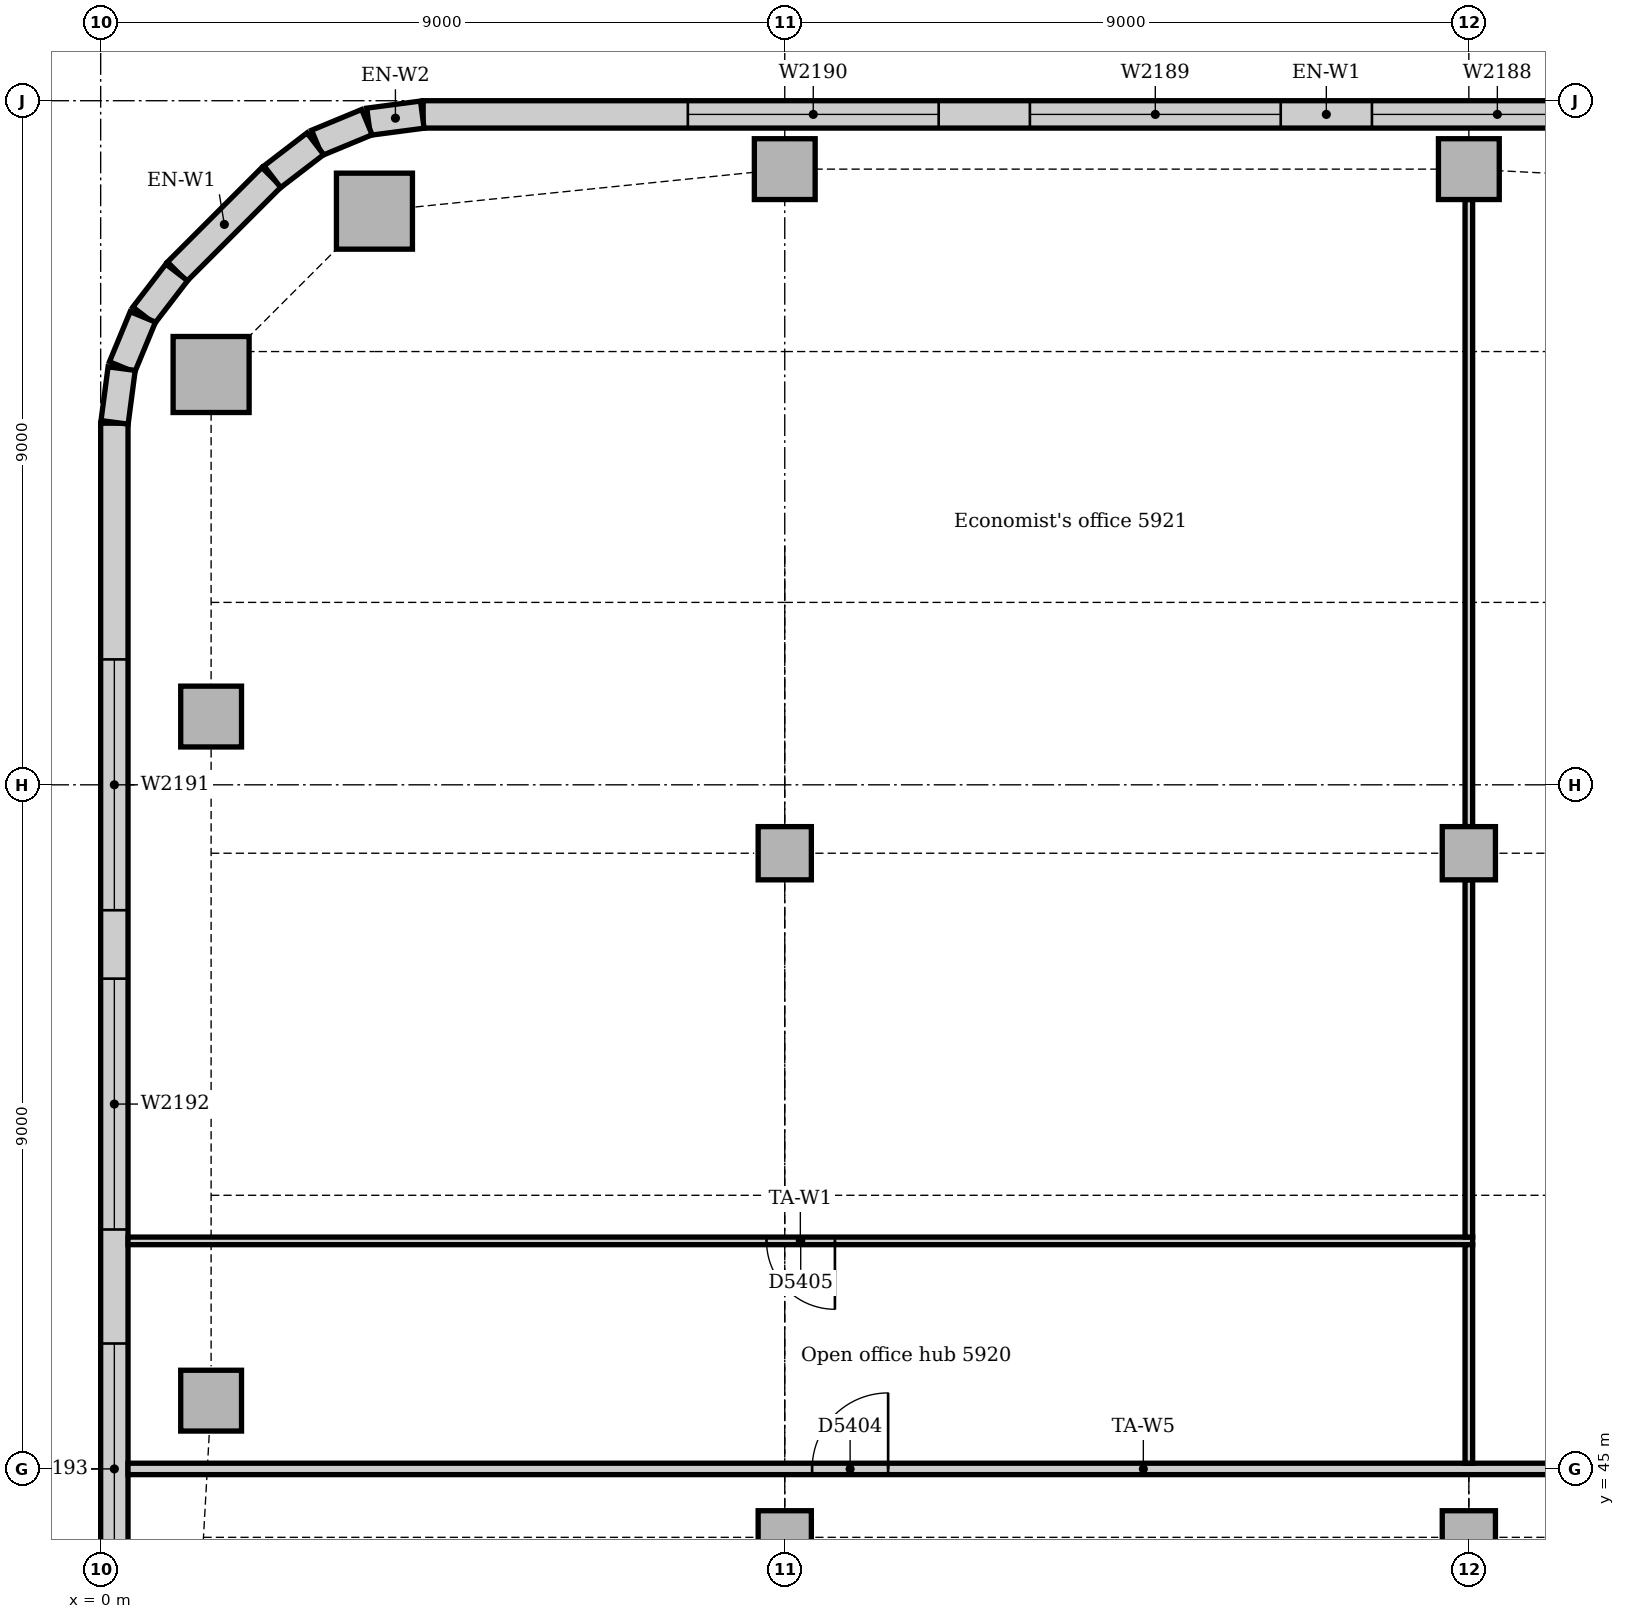
"""IFC4 building model, lengths in metres.
Left out: names, types, materials, properties, quantities, classifications, styles, units other than length and angle.
Written with IfcOpenShell. Run it as: python <this file> out.ifc"""

import sys

from ifc_helpers import new_model, si_unit, direction, frame, frame_2d, origin, origin_2d, place, context, subcontext, project, spatial, rectangle, extrude, element, fill, save


model = new_model("IFC4")
c1 = context("Model", 3, precision=1e-05, world=origin(), true_north=direction((0.0, 1.0)))
c2 = subcontext(c1, "Body", "Model", "MODEL_VIEW")
j1 = project(units=[si_unit("LENGTHUNIT", "METRE"), si_unit("PLANEANGLEUNIT", "RADIAN")], contexts=[c1])
p1 = place(None, origin())
s1 = spatial("IfcSite", under=j1, at=p1, CompositionType="ELEMENT")
p2 = place(p1, origin())
s2 = spatial("IfcBuilding", under=s1, at=p2, CompositionType="ELEMENT")
p3 = place(p2, frame((0.0, 0.0, 247.0)))
s3 = spatial("IfcBuildingStorey", under=s2, at=p3, CompositionType="ELEMENT", Elevation=247.0)
for number, where, z_axis, x_axis in (
    (1, (3.602, 61.547, -0.15), (0.0, 0.0, 1.0), (1.0, 0.0, 0.0)),
    (2, (1.453, 59.398, -0.15), (0.0, 0.0, 1.0), (1.0, 0.0, 0.0)),
):
    element("IfcColumn", number, at=place(p3, frame(where, z_axis=z_axis, x_axis=x_axis)), inside=s3, PredefinedType="COLUMN", context=c2, shape_type="SweptSolid", body=[
        extrude(rectangle(XDim=1.0, YDim=1.0, at=origin_2d()), origin(), (0.0, 0.0, 1.0), 4.0),
    ])
for number, where, z_axis, x_axis in (
    (3, (9.0, 62.1, -0.15), (0.0, 0.0, 1.0), (1.0, 0.0, 0.0)),
    (4, (18.0, 62.1, -0.15), (0.0, 0.0, 1.0), (1.0, 0.0, 0.0)),
):
    element("IfcColumn", number, at=place(p3, frame(where, z_axis=z_axis, x_axis=x_axis)), inside=s3, PredefinedType="COLUMN", context=c2, shape_type="SweptSolid", body=[
        extrude(rectangle(XDim=0.8, YDim=0.8, at=origin_2d()), origin(), (0.0, 0.0, 1.0), 4.0),
    ])
for number, where, z_axis, x_axis in (
    (5, (1.453, 45.898, 0.0), (0.0, 0.0, 1.0), (1.0, 0.0, 0.0)),
    (6, (1.453, 54.898, 0.0), (0.0, 0.0, 1.0), (1.0, 0.0, 0.0)),
):
    element("IfcColumn", number, at=place(p3, frame(where, z_axis=z_axis, x_axis=x_axis)), inside=s3, PredefinedType="COLUMN", context=c2, shape_type="SweptSolid", body=[
        extrude(rectangle(XDim=0.8, YDim=0.8, at=origin_2d()), origin(), (0.0, 0.0, 1.0), 3.85),
    ])
for number, where, z_axis, x_axis in (
    (7, (9.0, 44.1, 0.0), (0.0, 0.0, 1.0), (1.0, 0.0, 0.0)),
    (8, (9.0, 53.1, 0.0), (0.0, 0.0, 1.0), (1.0, 0.0, 0.0)),
    (9, (18.0, 44.1, 0.0), (0.0, 0.0, 1.0), (1.0, 0.0, 0.0)),
    (10, (18.0, 53.1, 0.0), (0.0, 0.0, 1.0), (1.0, 0.0, 0.0)),
):
    element("IfcColumn", number, at=place(p3, frame(where, z_axis=z_axis, x_axis=x_axis)), inside=s3, PredefinedType="COLUMN", context=c2, shape_type="SweptSolid", body=[
        extrude(rectangle(XDim=0.7, YDim=0.7, at=origin_2d()), origin(), (0.0, 0.0, 1.0), 3.85),
    ])
p4 = place(p3, frame((28.007, 62.82, 0.0), z_axis=(0.0, 0.0, 1.0), x_axis=(-1.0, 0.0, 0.0)))
e11 = element("IfcWall", 11, at=p4, inside=s3, PredefinedType="STANDARD", context=c2, shape_type="SweptSolid", body=[
    extrude(rectangle(XDim=23.765, YDim=0.36, at=frame_2d((11.882, 0.0))), origin(), (0.0, 0.0, 1.0), 3.85),
])
p5 = place(p4, frame((3.482, 0.0, 0.9)))
e12 = element("IfcOpeningElement", 12, at=p5, cuts=e11, PredefinedType="OPENING", context=c2, shape_type="SweptSolid", body=[
    extrude(rectangle(XDim=3.3, YDim=1.6, at=frame_2d((1.65, 0.8))), frame((0.0, 0.19, 0.0), z_axis=(0.0, -1.0, 0.0), x_axis=(1.0, 0.0, 0.0)), (0.0, 0.0, 1.0), 0.38),
])
p6 = place(p4, frame((7.982, 0.0, 0.9)))
e13 = element("IfcOpeningElement", 13, at=p6, cuts=e11, PredefinedType="OPENING", context=c2, shape_type="SweptSolid", body=[
    extrude(rectangle(XDim=3.3, YDim=1.6, at=frame_2d((1.65, 0.8))), frame((0.0, 0.19, 0.0), z_axis=(0.0, -1.0, 0.0), x_axis=(1.0, 0.0, 0.0)), (0.0, 0.0, 1.0), 0.38),
])
p7 = place(p4, frame((12.482, 0.0, 0.9)))
e14 = element("IfcOpeningElement", 14, at=p7, cuts=e11, PredefinedType="OPENING", context=c2, shape_type="SweptSolid", body=[
    extrude(rectangle(XDim=3.3, YDim=1.6, at=frame_2d((1.65, 0.8))), frame((0.0, 0.19, 0.0), z_axis=(0.0, -1.0, 0.0), x_axis=(1.0, 0.0, 0.0)), (0.0, 0.0, 1.0), 0.38),
])
p8 = place(p4, frame((16.982, 0.0, 0.9)))
e15 = element("IfcOpeningElement", 15, at=p8, cuts=e11, PredefinedType="OPENING", context=c2, shape_type="SweptSolid", body=[
    extrude(rectangle(XDim=3.3, YDim=1.6, at=frame_2d((1.65, 0.8))), frame((0.0, 0.19, 0.0), z_axis=(0.0, -1.0, 0.0), x_axis=(1.0, 0.0, 0.0)), (0.0, 0.0, 1.0), 0.38),
])
p9 = place(p3, frame((2.249, 61.994, 0.0), z_axis=(0.0, 0.0, 1.0), x_axis=(-0.707106781187, -0.707106781187, 0.0)))
e16 = element("IfcWall", 16, at=p9, inside=s3, PredefinedType="STANDARD", context=c2, shape_type="SweptSolid", body=[
    extrude(rectangle(XDim=1.757, YDim=0.36, at=frame_2d((0.879, 0.0))), origin(), (0.0, 0.0, 1.0), 3.85),
])
p10 = place(p3, frame((0.18, 58.757, 0.0), z_axis=(0.0, 0.0, 1.0), x_axis=(0.0, -1.0, 0.0)))
e17 = element("IfcWall", 17, at=p10, inside=s3, PredefinedType="STANDARD", context=c2, shape_type="SweptSolid", body=[
    extrude(rectangle(XDim=16.757, YDim=0.36, at=frame_2d((8.379, 0.0))), origin(), (0.0, 0.0, 1.0), 3.85),
])
p11 = place(p10, frame((3.107, 0.0, 0.9)))
e18 = element("IfcOpeningElement", 18, at=p11, cuts=e17, PredefinedType="OPENING", context=c2, shape_type="SweptSolid", body=[
    extrude(rectangle(XDim=3.3, YDim=1.6, at=frame_2d((1.65, 0.8))), frame((0.0, 0.19, 0.0), z_axis=(0.0, -1.0, 0.0), x_axis=(1.0, 0.0, 0.0)), (0.0, 0.0, 1.0), 0.38),
])
p12 = place(p10, frame((7.307, 0.0, 0.9)))
e19 = element("IfcOpeningElement", 19, at=p12, cuts=e17, PredefinedType="OPENING", context=c2, shape_type="SweptSolid", body=[
    extrude(rectangle(XDim=3.3, YDim=1.6, at=frame_2d((1.65, 0.8))), frame((0.0, 0.19, 0.0), z_axis=(0.0, -1.0, 0.0), x_axis=(1.0, 0.0, 0.0)), (0.0, 0.0, 1.0), 0.38),
])
p13 = place(p10, frame((12.107, 0.0, 0.9)))
e20 = element("IfcOpeningElement", 20, at=p13, cuts=e17, PredefinedType="OPENING", context=c2, shape_type="SweptSolid", body=[
    extrude(rectangle(XDim=3.3, YDim=1.6, at=frame_2d((1.65, 0.8))), frame((0.0, 0.19, 0.0), z_axis=(0.0, -1.0, 0.0), x_axis=(1.0, 0.0, 0.0)), (0.0, 0.0, 1.0), 0.38),
])
for number, where, z_axis, x_axis in (
    (21, (4.231, 62.817, 0.0), (0.0, 0.0, 1.0), (-0.991, -0.131, 0.0)),
    (22, (3.503, 62.718, 0.0), (0.0, 0.0, 1.0), (-0.924, -0.383, 0.0)),
):
    element("IfcWall", number, at=place(p3, frame(where, z_axis=z_axis, x_axis=x_axis)), inside=s3, PredefinedType="STANDARD", context=c2, shape_type="SweptSolid", body=[
        extrude(rectangle(XDim=0.713, YDim=0.36, at=frame_2d((0.356, 0.0))), origin(), (0.0, 0.0, 1.0), 3.85),
    ])
for number, where, z_axis, x_axis in (
    (23, (2.825, 62.434, 0.0), (0.0, 0.0, 1.0), (-0.793, -0.609, 0.0)),
    (24, (1.0, 60.741, 0.0), (0.0, 0.0, 1.0), (-0.609, -0.793, 0.0)),
):
    element("IfcWall", number, at=place(p3, frame(where, z_axis=z_axis, x_axis=x_axis)), inside=s3, PredefinedType="STANDARD", context=c2, shape_type="SweptSolid", body=[
        extrude(rectangle(XDim=0.713, YDim=0.36, at=frame_2d((0.357, 0.0))), origin(), (0.0, 0.0, 1.0), 3.85),
    ])
for number, where, z_axis, x_axis in (
    (25, (0.555, 60.156, 0.0), (0.0, 0.0, 1.0), (-0.383, -0.924, 0.0)),
    (26, (0.276, 59.476, 0.0), (0.0, 0.0, 1.0), (-0.131, -0.991, 0.0)),
):
    element("IfcWall", number, at=place(p3, frame(where, z_axis=z_axis, x_axis=x_axis)), inside=s3, PredefinedType="STANDARD", context=c2, shape_type="SweptSolid", body=[
        extrude(rectangle(XDim=0.713, YDim=0.36, at=frame_2d((0.356, 0.0))), origin(), (0.0, 0.0, 1.0), 3.85),
    ])
p14 = place(p3, frame((0.36, 45.0, 0.0), z_axis=(0.0, 0.0, 1.0), x_axis=(1.0, 0.0, 0.0)))
e27 = element("IfcWall", 27, at=p14, inside=s3, PredefinedType="PARTITIONING", context=c2, shape_type="SweptSolid", body=[
    extrude(rectangle(XDim=26.715, YDim=0.15, at=frame_2d((13.357, 0.0))), origin(), (0.0, 0.0, 1.0), 3.85),
])
p15 = place(p14, frame((9.0, 0.0, 0.0)))
e28 = element("IfcOpeningElement", 28, at=p15, cuts=e27, PredefinedType="OPENING", context=c2, shape_type="SweptSolid", body=[
    extrude(rectangle(XDim=1.0, YDim=2.1, at=frame_2d((0.5, 1.05))), frame((0.0, 0.085, 0.0), z_axis=(0.0, -1.0, 0.0), x_axis=(1.0, 0.0, 0.0)), (0.0, 0.0, 1.0), 0.17),
])
p16 = place(p14, frame((21.64, 0.0, 0.0)))
e29 = element("IfcOpeningElement", 29, at=p16, cuts=e27, PredefinedType="OPENING", context=c2, shape_type="SweptSolid", body=[
    extrude(rectangle(XDim=0.9, YDim=2.1, at=frame_2d((0.45, 1.05))), frame((0.0, 0.085, 0.0), z_axis=(0.0, -1.0, 0.0), x_axis=(1.0, 0.0, 0.0)), (0.0, 0.0, 1.0), 0.17),
])
p17 = place(p3, frame((0.36, 48.0, 0.0), z_axis=(0.0, 0.0, 1.0), x_axis=(1.0, 0.0, 0.0)))
e30 = element("IfcWall", 30, at=p17, inside=s3, PredefinedType="PARTITIONING", context=c2, shape_type="SweptSolid", body=[
    extrude(rectangle(XDim=17.69, YDim=0.1, at=frame_2d((8.845, 0.0))), origin(), (0.0, 0.0, 1.0), 3.85),
])
p18 = place(p17, frame((8.4, 0.0, 0.0)))
e31 = element("IfcOpeningElement", 31, at=p18, cuts=e30, PredefinedType="OPENING", context=c2, shape_type="SweptSolid", body=[
    extrude(rectangle(XDim=0.9, YDim=2.1, at=frame_2d((0.45, 1.05))), frame((0.0, 0.06, 0.0), z_axis=(0.0, -1.0, 0.0), x_axis=(1.0, 0.0, 0.0)), (0.0, 0.0, 1.0), 0.12),
])
p19 = place(p3, frame((18.0, 45.075, 0.0), z_axis=(0.0, 0.0, 1.0), x_axis=(0.0, 1.0, 0.0)))
e32 = element("IfcWall", 32, at=p19, inside=s3, PredefinedType="PARTITIONING", context=c2, shape_type="SweptSolid", body=[
    extrude(rectangle(XDim=2.875, YDim=0.1, at=frame_2d((1.438, 0.0))), origin(), (0.0, 0.0, 1.0), 3.4),
])
p20 = place(p3, frame((18.0, 48.05, 0.0), z_axis=(0.0, 0.0, 1.0), x_axis=(0.0, 1.0, 0.0)))
e33 = element("IfcWall", 33, at=p20, inside=s3, PredefinedType="PARTITIONING", context=c2, shape_type="SweptSolid", body=[
    extrude(rectangle(XDim=4.7, YDim=0.1, at=frame_2d((2.35, 0.0))), origin(), (0.0, 0.0, 1.0), 3.4),
])
p21 = place(p3, frame((18.0, 53.45, 0.0), z_axis=(0.0, 0.0, 1.0), x_axis=(0.0, 1.0, 0.0)))
e34 = element("IfcWall", 34, at=p21, inside=s3, PredefinedType="PARTITIONING", context=c2, shape_type="SweptSolid", body=[
    extrude(rectangle(XDim=8.25, YDim=0.1, at=frame_2d((4.125, 0.0))), origin(), (0.0, 0.0, 1.0), 3.4),
])
p22 = place(p6, origin())
e35 = element("IfcWindow", 35, at=p22, inside=s3, PartitioningType="SINGLE_PANEL", PredefinedType="WINDOW", context=c2, shape_type="SweptSolid", body=[
    extrude(rectangle(XDim=3.3, YDim=1.6, at=frame_2d((1.65, 0.8))), frame((0.0, 0.13, 0.0), z_axis=(0.0, -1.0, 0.0), x_axis=(1.0, 0.0, 0.0)), (0.0, 0.0, 1.0), 0.06),
])
fill(e13, e35)
p23 = place(p7, origin())
e36 = element("IfcWindow", 36, at=p23, inside=s3, PartitioningType="SINGLE_PANEL", PredefinedType="WINDOW", context=c2, shape_type="SweptSolid", body=[
    extrude(rectangle(XDim=3.3, YDim=1.6, at=frame_2d((1.65, 0.8))), frame((0.0, 0.13, 0.0), z_axis=(0.0, -1.0, 0.0), x_axis=(1.0, 0.0, 0.0)), (0.0, 0.0, 1.0), 0.06),
])
fill(e14, e36)
p24 = place(p8, origin())
e37 = element("IfcWindow", 37, at=p24, inside=s3, PartitioningType="SINGLE_PANEL", PredefinedType="WINDOW", context=c2, shape_type="SweptSolid", body=[
    extrude(rectangle(XDim=3.3, YDim=1.6, at=frame_2d((1.65, 0.8))), frame((0.0, 0.13, 0.0), z_axis=(0.0, -1.0, 0.0), x_axis=(1.0, 0.0, 0.0)), (0.0, 0.0, 1.0), 0.06),
])
fill(e15, e37)
p25 = place(p11, origin())
e38 = element("IfcWindow", 38, at=p25, inside=s3, PartitioningType="SINGLE_PANEL", PredefinedType="WINDOW", context=c2, shape_type="SweptSolid", body=[
    extrude(rectangle(XDim=3.3, YDim=1.6, at=frame_2d((1.65, 0.8))), frame((0.0, 0.13, 0.0), z_axis=(0.0, -1.0, 0.0), x_axis=(1.0, 0.0, 0.0)), (0.0, 0.0, 1.0), 0.06),
])
fill(e18, e38)
p26 = place(p12, origin())
e39 = element("IfcWindow", 39, at=p26, inside=s3, PartitioningType="SINGLE_PANEL", PredefinedType="WINDOW", context=c2, shape_type="SweptSolid", body=[
    extrude(rectangle(XDim=3.3, YDim=1.6, at=frame_2d((1.65, 0.8))), frame((0.0, 0.13, 0.0), z_axis=(0.0, -1.0, 0.0), x_axis=(1.0, 0.0, 0.0)), (0.0, 0.0, 1.0), 0.06),
])
fill(e19, e39)
p27 = place(p13, origin())
e40 = element("IfcWindow", 40, at=p27, inside=s3, PartitioningType="SINGLE_PANEL", PredefinedType="WINDOW", context=c2, shape_type="SweptSolid", body=[
    extrude(rectangle(XDim=3.3, YDim=1.6, at=frame_2d((1.65, 0.8))), frame((0.0, 0.13, 0.0), z_axis=(0.0, -1.0, 0.0), x_axis=(1.0, 0.0, 0.0)), (0.0, 0.0, 1.0), 0.06),
])
fill(e20, e40)
p28 = place(p15, origin())
e41 = element("IfcDoor", 41, at=p28, inside=s3, OperationType="SINGLE_SWING_RIGHT", PredefinedType="DOOR", context=c2, shape_type="SweptSolid", body=[
    extrude(rectangle(XDim=1.0, YDim=2.1, at=frame_2d((0.5, 1.05))), frame((0.0, 0.025, 0.0), z_axis=(0.0, -1.0, 0.0), x_axis=(1.0, 0.0, 0.0)), (0.0, 0.0, 1.0), 0.05),
])
fill(e28, e41)
p29 = place(p18, frame((0.9, 0.0, 0.0), z_axis=(0.0, 0.0, 1.0), x_axis=(-1.0, 0.0, 0.0)))
e42 = element("IfcDoor", 42, at=p29, inside=s3, OperationType="SINGLE_SWING_LEFT", PredefinedType="DOOR", context=c2, shape_type="SweptSolid", body=[
    extrude(rectangle(XDim=0.9, YDim=2.1, at=frame_2d((0.45, 1.05))), frame((0.0, 0.025, 0.0), z_axis=(0.0, -1.0, 0.0), x_axis=(1.0, 0.0, 0.0)), (0.0, 0.0, 1.0), 0.05),
])
fill(e31, e42)
save(model, sys.argv[1])
